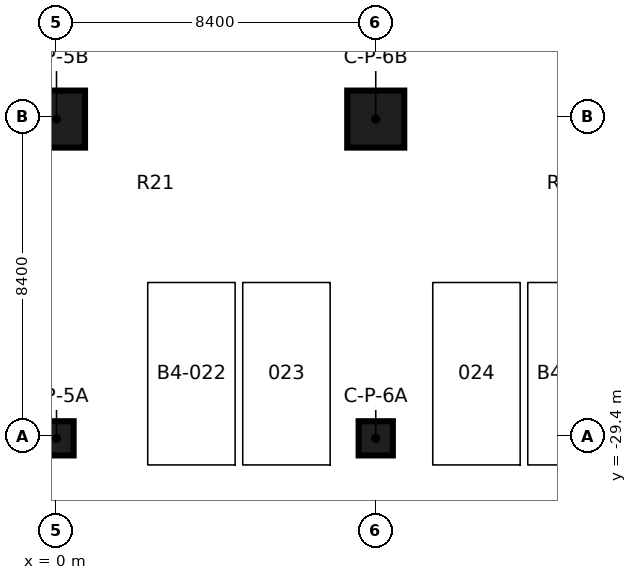
"""IFC4 building model, lengths in metres.
Left out: names, types, materials, properties, quantities, classifications, styles, units other than length and angle.
Written with IfcOpenShell. Run it as: python <this file> out.ifc"""

import sys

from ifc_helpers import new_model, si_unit, direction, frame, origin, origin_2d, place, context, subcontext, project, spatial, rectangle, extrude, element, save


model = new_model("IFC4")
c1 = context("Model", 3, precision=1e-05, world=origin(), true_north=direction((0.0, 1.0)))
c2 = subcontext(c1, "Body", "Model", "MODEL_VIEW")
j1 = project(units=[si_unit("LENGTHUNIT", "METRE"), si_unit("PLANEANGLEUNIT", "RADIAN")], contexts=[c1])
p1 = place(None, origin())
s1 = spatial("IfcSite", under=j1, at=p1, CompositionType="ELEMENT")
p2 = place(p1, origin())
s2 = spatial("IfcBuilding", under=s1, at=p2, CompositionType="ELEMENT")
p3 = place(p2, frame((0.0, 0.0, -17.0)))
s3 = spatial("IfcBuildingStorey", under=s2, at=p3, CompositionType="ELEMENT", Elevation=-17.0)
p4 = place(p3, frame((0.0, -29.4, 0.0), z_axis=(0.0, 0.0, 1.0), x_axis=(1.0, 0.0, 0.0)))
e1 = element("IfcColumn", 1, at=p4, inside=s3, PredefinedType="COLUMN", context=c2, shape_type="SweptSolid", body=[
    extrude(rectangle(XDim=0.9, YDim=0.9, at=origin_2d()), origin(), (0.0, 0.0, 1.0), 3.7),
])
p5 = place(p3, frame((0.0, -21.0, 0.0), z_axis=(0.0, 0.0, 1.0), x_axis=(1.0, 0.0, 0.0)))
e2 = element("IfcColumn", 2, at=p5, inside=s3, PredefinedType="COLUMN", context=c2, shape_type="SweptSolid", body=[
    extrude(rectangle(XDim=1.5, YDim=1.5, at=origin_2d()), origin(), (0.0, 0.0, 1.0), 3.7),
])
p6 = place(p3, frame((8.4, -29.4, 0.0), z_axis=(0.0, 0.0, 1.0), x_axis=(1.0, 0.0, 0.0)))
e3 = element("IfcColumn", 3, at=p6, inside=s3, PredefinedType="COLUMN", context=c2, shape_type="SweptSolid", body=[
    extrude(rectangle(XDim=0.9, YDim=0.9, at=origin_2d()), origin(), (0.0, 0.0, 1.0), 3.7),
])
p7 = place(p3, frame((8.4, -21.0, 0.0), z_axis=(0.0, 0.0, 1.0), x_axis=(1.0, 0.0, 0.0)))
e4 = element("IfcColumn", 4, at=p7, inside=s3, PredefinedType="COLUMN", context=c2, shape_type="SweptSolid", body=[
    extrude(rectangle(XDim=1.5, YDim=1.5, at=origin_2d()), origin(), (0.0, 0.0, 1.0), 3.7),
])
save(model, sys.argv[1])
